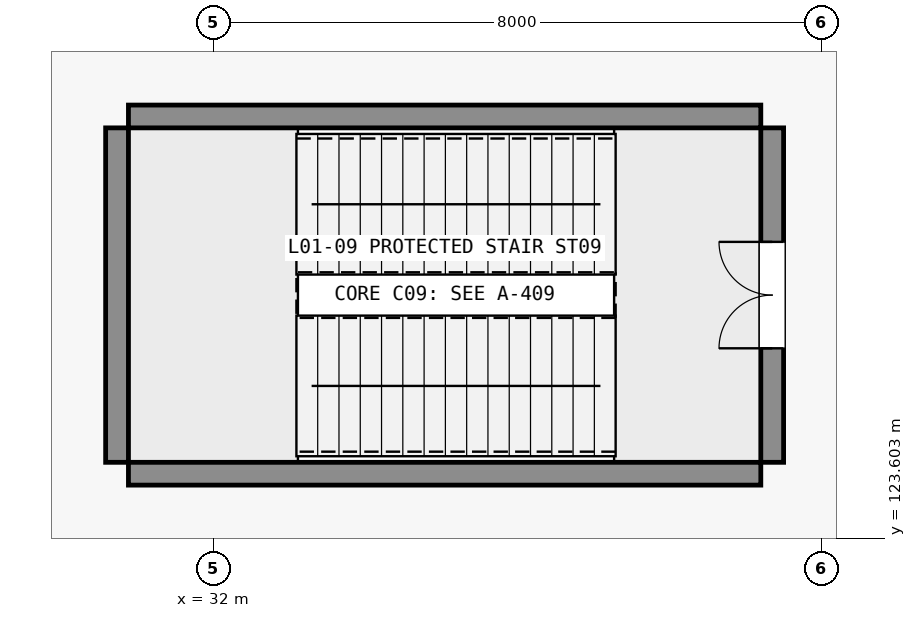
"""IFC4 building model, lengths in metres.
Left out: names, types, materials, properties, quantities, classifications, styles, units other than length and angle.
Written with IfcOpenShell. Run it as: python <this file> out.ifc"""

import sys

from ifc_helpers import new_model, si_unit, direction, frame, frame_2d, origin, place, context, subcontext, project, spatial, rectangle, extrude, element, fill, save


model = new_model("IFC4")
c1 = context("Model", 3, precision=1e-05, world=origin(), true_north=direction((0.0, 1.0)))
c2 = subcontext(c1, "Body", "Model", "MODEL_VIEW")
j1 = project(units=[si_unit("LENGTHUNIT", "METRE"), si_unit("PLANEANGLEUNIT", "RADIAN")], contexts=[c1])
p1 = place(None, origin())
s1 = spatial("IfcSite", under=j1, at=p1, CompositionType="ELEMENT")
p2 = place(p1, origin())
s2 = spatial("IfcBuilding", under=s1, at=p2, CompositionType="ELEMENT")
p3 = place(p2, frame((0.0, 0.0, 6.0)))
s3 = spatial("IfcBuildingStorey", under=s2, at=p3, CompositionType="ELEMENT", Elevation=6.0)
for number, where, z_axis, x_axis in (
    (1, (30.88, 124.45, 0.0), (0.0, 0.0, 1.0), (1.0, 0.0, 0.0)),
    (2, (30.88, 129.15, 0.0), (0.0, 0.0, 1.0), (1.0, 0.0, 0.0)),
):
    element("IfcWall", number, at=place(p3, frame(where, z_axis=z_axis, x_axis=x_axis)), inside=s3, PredefinedType="SHEAR", context=c2, shape_type="SweptSolid", body=[
        extrude(rectangle(XDim=8.32, YDim=0.3, at=frame_2d((4.16, 0.0))), origin(), (0.0, 0.0, 1.0), 5.4),
    ])
p4 = place(p3, frame((30.73, 124.6, 0.0), z_axis=(0.0, 0.0, 1.0), x_axis=(0.0, 1.0, 0.0)))
e3 = element("IfcWall", 3, at=p4, inside=s3, PredefinedType="SHEAR", context=c2, shape_type="SweptSolid", body=[
    extrude(rectangle(XDim=4.4, YDim=0.3, at=frame_2d((2.2, 0.0))), origin(), (0.0, 0.0, 1.0), 5.4),
])
p5 = place(p3, frame((39.35, 124.6, 0.0), z_axis=(0.0, 0.0, 1.0), x_axis=(0.0, 1.0, 0.0)))
e4 = element("IfcWall", 4, at=p5, inside=s3, PredefinedType="SHEAR", context=c2, shape_type="SweptSolid", body=[
    extrude(rectangle(XDim=4.4, YDim=0.3, at=frame_2d((2.2, 0.0))), origin(), (0.0, 0.0, 1.0), 5.4),
])
p6 = place(p5, frame((1.5, 0.0, 0.0)))
e5 = element("IfcOpeningElement", 5, at=p6, cuts=e4, PredefinedType="OPENING", context=c2, shape_type="SweptSolid", body=[
    extrude(rectangle(XDim=1.4, YDim=2.2, at=frame_2d((0.7, 1.1))), frame((0.0, 0.16, 0.0), z_axis=(0.0, -1.0, 0.0), x_axis=(1.0, 0.0, 0.0)), (0.0, 0.0, 1.0), 0.32),
])
p7 = place(p6, origin())
e6 = element("IfcDoor", 6, at=p7, inside=s3, OperationType="DOUBLE_DOOR_SINGLE_SWING", PredefinedType="DOOR", context=c2, shape_type="SweptSolid", body=[
    extrude(rectangle(XDim=1.4, YDim=2.2, at=frame_2d((0.7, 1.1))), frame((0.0, 0.025, 0.0), z_axis=(0.0, -1.0, 0.0), x_axis=(1.0, 0.0, 0.0)), (0.0, 0.0, 1.0), 0.05),
])
fill(e5, e6)
save(model, sys.argv[1])
